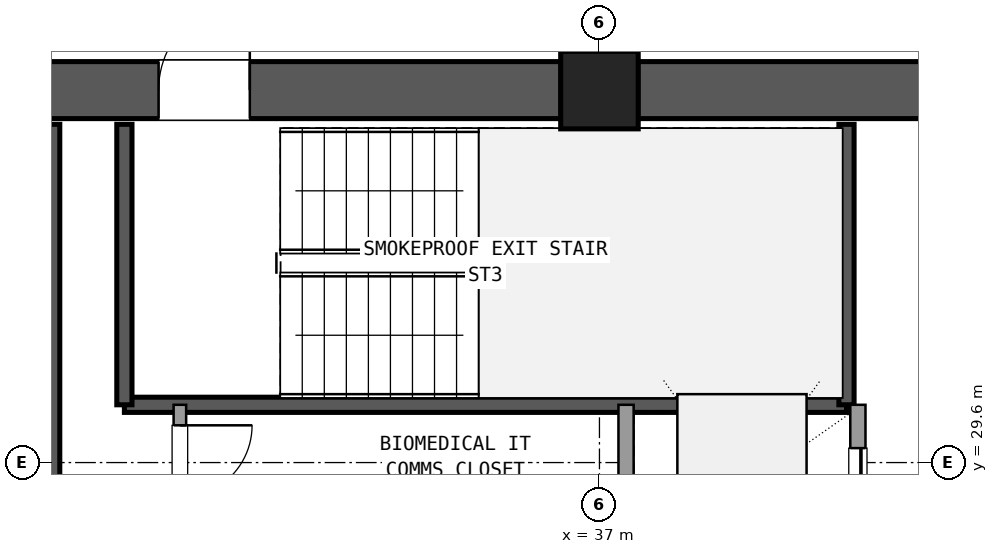
"""IFC4 building model, lengths in metres.
Left out: names, types, materials, properties, quantities, classifications, styles, units other than length and angle.
Written with IfcOpenShell. Run it as: python <this file> out.ifc"""

import sys

from ifc_helpers import new_model, si_unit, direction, frame, frame_2d, origin, origin_2d, place, context, subcontext, project, spatial, rectangle, extrude, element, fill, save


model = new_model("IFC4")
c1 = context("Model", 3, precision=1e-05, world=origin(), true_north=direction((0.0, 1.0)))
c2 = subcontext(c1, "Body", "Model", "MODEL_VIEW")
j1 = project(units=[si_unit("LENGTHUNIT", "METRE"), si_unit("PLANEANGLEUNIT", "RADIAN")], contexts=[c1])
p1 = place(None, origin())
s1 = spatial("IfcSite", under=j1, at=p1, CompositionType="ELEMENT")
p2 = place(p1, origin())
s2 = spatial("IfcBuilding", under=s1, at=p2, CompositionType="ELEMENT")
p3 = place(p2, frame((0.0, 0.0, 145.62)))
s3 = spatial("IfcBuildingStorey", under=s2, at=p3, CompositionType="ELEMENT", Elevation=145.62)
p4 = place(p3, frame((37.0, 34.5, 0.0), z_axis=(0.0, 0.0, 1.0), x_axis=(1.0, 0.0, 0.0)))
e1 = element("IfcColumn", 1, at=p4, inside=s3, PredefinedType="COLUMN", context=c2, shape_type="SweptSolid", body=[
    extrude(rectangle(XDim=1.02, YDim=1.02, at=origin_2d()), origin(), (0.0, 0.0, 1.0), 3.6),
])
p5 = place(p3, frame((47.695, 34.5, 0.0), z_axis=(0.0, 0.0, 1.0), x_axis=(-1.0, 0.0, 0.0)))
e2 = element("IfcWall", 2, at=p5, inside=s3, PredefinedType="SHEAR", context=c2, shape_type="SweptSolid", body=[
    extrude(rectangle(XDim=10.19, YDim=0.75, at=frame_2d((5.095, 0.0))), origin(), (0.0, 0.0, 1.0), 3.32),
])
p6 = place(p5, frame((4.595, 0.0, 0.0)))
e3 = element("IfcOpeningElement", 3, at=p6, cuts=e2, PredefinedType="OPENING", context=c2, shape_type="SweptSolid", body=[
    extrude(rectangle(XDim=1.6, YDim=2.2, at=frame_2d((0.8, 1.1))), frame((0.0, 0.385, 0.0), z_axis=(0.0, -1.0, 0.0), x_axis=(1.0, 0.0, 0.0)), (0.0, 0.0, 1.0), 0.77),
])
p7 = place(p3, frame((36.495, 34.5, 0.0), z_axis=(0.0, 0.0, 1.0), x_axis=(-1.0, 0.0, 0.0)))
e4 = element("IfcWall", 4, at=p7, inside=s3, PredefinedType="SHEAR", context=c2, shape_type="SweptSolid", body=[
    extrude(rectangle(XDim=10.19, YDim=0.75, at=frame_2d((5.095, 0.0))), origin(), (0.0, 0.0, 1.0), 3.32),
])
p8 = place(p7, frame((4.095, 0.0, 0.0)))
e5 = element("IfcOpeningElement", 5, at=p8, cuts=e4, PredefinedType="OPENING", context=c2, shape_type="SweptSolid", body=[
    extrude(rectangle(XDim=1.2, YDim=2.15, at=frame_2d((0.6, 1.075))), frame((0.0, 0.385, 0.0), z_axis=(0.0, -1.0, 0.0), x_axis=(1.0, 0.0, 0.0)), (0.0, 0.0, 1.0), 0.77),
])
p9 = place(p3, frame((29.8, 24.65, 0.0), z_axis=(0.0, 0.0, 1.0), x_axis=(0.0, 1.0, 0.0)))
e6 = element("IfcWall", 6, at=p9, inside=s3, PredefinedType="SHEAR", context=c2, shape_type="SweptSolid", body=[
    extrude(rectangle(XDim=9.4, YDim=0.2, at=frame_2d((4.7, 0.0))), origin(), (0.0, 0.0, 1.0), 3.32),
])
p10 = place(p3, frame((30.75, 30.36, 0.0), z_axis=(0.0, 0.0, 1.0), x_axis=(1.0, 0.0, 0.0)))
e7 = element("IfcWall", 7, at=p10, inside=s3, PredefinedType="SHEAR", context=c2, shape_type="SweptSolid", body=[
    extrude(rectangle(XDim=9.5, YDim=0.2, at=frame_2d((4.75, 0.0))), origin(), (0.0, 0.0, 1.0), 3.32),
])
for number, where, z_axis, x_axis in (
    (8, (30.75, 30.36, 0.0), (0.0, 0.0, 1.0), (0.0, 1.0, 0.0)),
    (9, (40.25, 30.36, 0.0), (0.0, 0.0, 1.0), (0.0, 1.0, 0.0)),
):
    element("IfcWall", number, at=place(p3, frame(where, z_axis=z_axis, x_axis=x_axis)), inside=s3, PredefinedType="SHEAR", context=c2, shape_type="SweptSolid", body=[
        extrude(rectangle(XDim=3.69, YDim=0.2, at=frame_2d((1.845, 0.0))), origin(), (0.0, 0.0, 1.0), 3.32),
    ])
p11 = place(p3, frame((37.35, 23.54, 0.0), z_axis=(0.0, 0.0, 1.0), x_axis=(0.0, 1.0, 0.0)))
e10 = element("IfcWall", 10, at=p11, inside=s3, PredefinedType="SOLIDWALL", context=c2, shape_type="SweptSolid", body=[
    extrude(rectangle(XDim=6.82, YDim=0.2, at=frame_2d((3.41, 0.0))), origin(), (0.0, 0.0, 1.0), 2.61),
])
p12 = place(p3, frame((40.4, 23.54, 0.0), z_axis=(0.0, 0.0, 1.0), x_axis=(0.0, 1.0, 0.0)))
e11 = element("IfcWall", 11, at=p12, inside=s3, PredefinedType="SOLIDWALL", context=c2, shape_type="SweptSolid", body=[
    extrude(rectangle(XDim=6.82, YDim=0.2, at=frame_2d((3.41, 0.0))), origin(), (0.0, 0.0, 1.0), 2.61),
])
p13 = place(p12, frame((0.35, 0.0, 0.0)))
e12 = element("IfcOpeningElement", 12, at=p13, cuts=e11, PredefinedType="OPENING", context=c2, shape_type="SweptSolid", body=[
    extrude(rectangle(XDim=1.4, YDim=2.2, at=frame_2d((0.7, 1.1))), frame((0.0, 0.11, 0.0), z_axis=(0.0, -1.0, 0.0), x_axis=(1.0, 0.0, 0.0)), (0.0, 0.0, 1.0), 0.22),
])
p14 = place(p12, frame((2.65, 0.0, 0.0)))
e13 = element("IfcOpeningElement", 13, at=p14, cuts=e11, PredefinedType="OPENING", context=c2, shape_type="SweptSolid", body=[
    extrude(rectangle(XDim=1.4, YDim=2.2, at=frame_2d((0.7, 1.1))), frame((0.0, 0.11, 0.0), z_axis=(0.0, -1.0, 0.0), x_axis=(1.0, 0.0, 0.0)), (0.0, 0.0, 1.0), 0.22),
])
p15 = place(p12, frame((4.85, 0.0, 0.0)))
e14 = element("IfcOpeningElement", 14, at=p15, cuts=e11, PredefinedType="OPENING", context=c2, shape_type="SweptSolid", body=[
    extrude(rectangle(XDim=1.4, YDim=2.2, at=frame_2d((0.7, 1.1))), frame((0.0, 0.11, 0.0), z_axis=(0.0, -1.0, 0.0), x_axis=(1.0, 0.0, 0.0)), (0.0, 0.0, 1.0), 0.22),
])
p16 = place(p3, frame((31.48, 26.32, 0.0), z_axis=(0.0, 0.0, 1.0), x_axis=(0.0, 1.0, 0.0)))
e15 = element("IfcWall", 15, at=p16, inside=s3, PredefinedType="PLUMBINGWALL", context=c2, shape_type="SweptSolid", body=[
    extrude(rectangle(XDim=4.04, YDim=0.165, at=frame_2d((2.02, 0.0))), origin(), (0.0, 0.0, 1.0), 2.61),
])
p17 = place(p16, frame((0.18, 0.0, 0.0)))
e16 = element("IfcOpeningElement", 16, at=p17, cuts=e15, PredefinedType="OPENING", context=c2, shape_type="SweptSolid", body=[
    extrude(rectangle(XDim=0.95, YDim=2.1, at=frame_2d((0.475, 1.05))), frame((0.0, 0.093, 0.0), z_axis=(0.0, -1.0, 0.0), x_axis=(1.0, 0.0, 0.0)), (0.0, 0.0, 1.0), 0.185),
])
p18 = place(p16, frame((1.5, 0.0, 0.0)))
e17 = element("IfcOpeningElement", 17, at=p18, cuts=e15, PredefinedType="OPENING", context=c2, shape_type="SweptSolid", body=[
    extrude(rectangle(XDim=0.95, YDim=2.1, at=frame_2d((0.475, 1.05))), frame((0.0, 0.093, 0.0), z_axis=(0.0, -1.0, 0.0), x_axis=(1.0, 0.0, 0.0)), (0.0, 0.0, 1.0), 0.185),
])
p19 = place(p16, frame((2.82, 0.0, 0.0)))
e18 = element("IfcOpeningElement", 18, at=p19, cuts=e15, PredefinedType="OPENING", context=c2, shape_type="SweptSolid", body=[
    extrude(rectangle(XDim=0.95, YDim=2.1, at=frame_2d((0.475, 1.05))), frame((0.0, 0.093, 0.0), z_axis=(0.0, -1.0, 0.0), x_axis=(1.0, 0.0, 0.0)), (0.0, 0.0, 1.0), 0.185),
])
p20 = place(p3, frame((37.0, 34.95, 0.0), z_axis=(0.0, 0.0, 1.0), x_axis=(0.0, 1.0, 0.0)))
e19 = element("IfcWall", 19, at=p20, inside=s3, PredefinedType="PARTITIONING", context=c2, shape_type="SweptSolid", body=[
    extrude(rectangle(XDim=3.21, YDim=0.18, at=frame_2d((1.605, 0.0))), origin(), (0.0, 0.0, 1.0), 2.61),
])
p21 = place(p20, frame((0.605, 0.0, 0.0)))
e20 = element("IfcOpeningElement", 20, at=p21, cuts=e19, PredefinedType="OPENING", context=c2, shape_type="SweptSolid", body=[
    extrude(rectangle(XDim=2.0, YDim=2.2, at=frame_2d((1.0, 1.1))), frame((0.0, 0.1, 0.0), z_axis=(0.0, -1.0, 0.0), x_axis=(1.0, 0.0, 0.0)), (0.0, 0.0, 1.0), 0.2),
])
p22 = place(p8, frame((1.2, 0.0, 0.0), z_axis=(0.0, 0.0, 1.0), x_axis=(-1.0, 0.0, 0.0)))
e21 = element("IfcDoor", 21, at=p22, inside=s3, OperationType="SINGLE_SWING_LEFT", PredefinedType="DOOR", context=c2, shape_type="SweptSolid", body=[
    extrude(rectangle(XDim=1.2, YDim=2.15, at=frame_2d((0.6, 1.075))), frame((0.0, 0.025, 0.0), z_axis=(0.0, -1.0, 0.0), x_axis=(1.0, 0.0, 0.0)), (0.0, 0.0, 1.0), 0.05),
])
fill(e5, e21)
p23 = place(p15, origin())
e22 = element("IfcDoor", 22, at=p23, inside=s3, OperationType="SLIDING_TO_RIGHT", PredefinedType="DOOR", context=c2, shape_type="SweptSolid", body=[
    extrude(rectangle(XDim=1.4, YDim=2.2, at=frame_2d((0.7, 1.1))), frame((0.0, 0.025, 0.0), z_axis=(0.0, -1.0, 0.0), x_axis=(1.0, 0.0, 0.0)), (0.0, 0.0, 1.0), 0.05),
])
fill(e14, e22)
p24 = place(p19, frame((0.95, 0.0, 0.0), z_axis=(0.0, 0.0, 1.0), x_axis=(-1.0, 0.0, 0.0)))
e23 = element("IfcDoor", 23, at=p24, inside=s3, OperationType="SINGLE_SWING_RIGHT", PredefinedType="DOOR", context=c2, shape_type="SweptSolid", body=[
    extrude(rectangle(XDim=0.95, YDim=2.1, at=frame_2d((0.475, 1.05))), frame((0.0, 0.025, 0.0), z_axis=(0.0, -1.0, 0.0), x_axis=(1.0, 0.0, 0.0)), (0.0, 0.0, 1.0), 0.05),
])
fill(e18, e23)
save(model, sys.argv[1])
